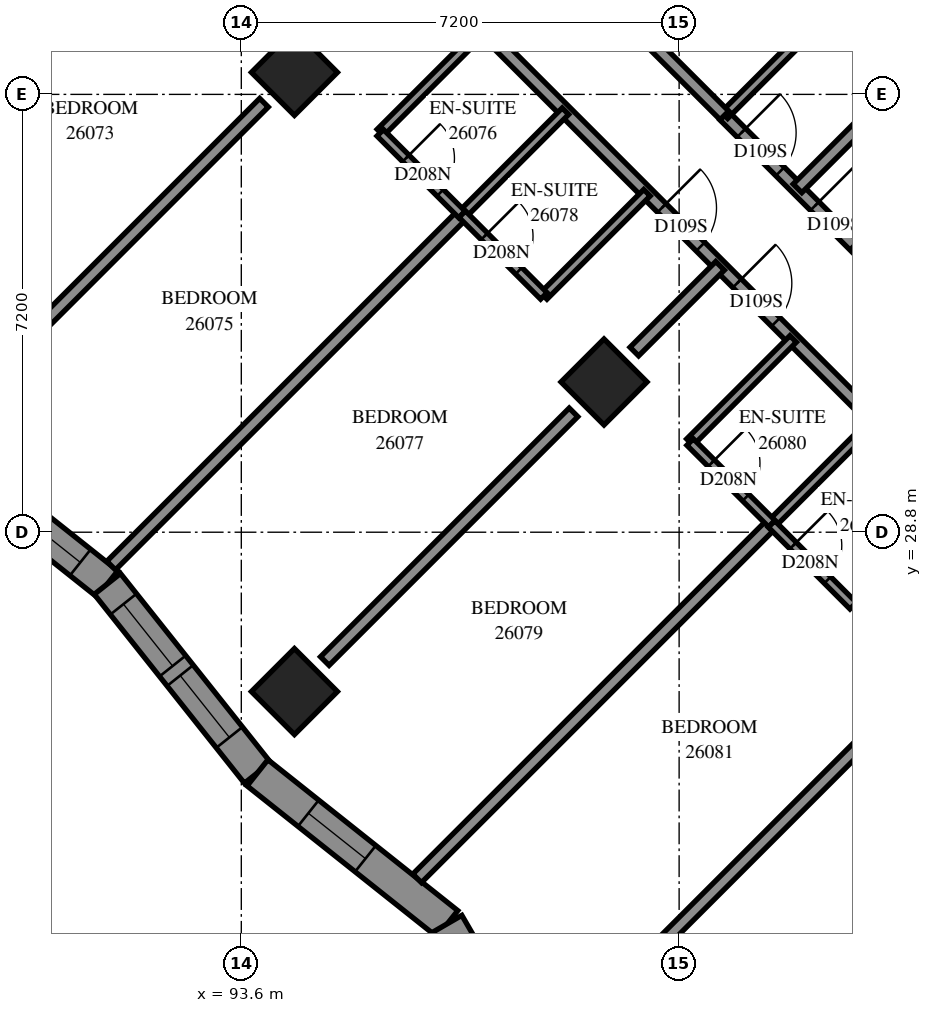
"""IFC4 building model, lengths in metres.
Left out: names, types, materials, properties, quantities, classifications, styles, units other than length and angle.
Written with IfcOpenShell. Run it as: python <this file> out.ifc"""

import sys

from ifc_helpers import new_model, si_unit, direction, frame, frame_2d, origin, origin_2d, place, context, subcontext, project, spatial, polyline, rectangle, outline, extrude, element, fill, save


model = new_model("IFC4")
c1 = context("Model", 3, precision=1e-05, world=origin(), true_north=direction((0.0, 1.0)))
c2 = subcontext(c1, "Body", "Model", "MODEL_VIEW")
j1 = project(units=[si_unit("LENGTHUNIT", "METRE"), si_unit("PLANEANGLEUNIT", "RADIAN")], contexts=[c1])
p1 = place(None, origin())
s1 = spatial("IfcSite", under=j1, at=p1, CompositionType="ELEMENT")
p2 = place(p1, origin())
s2 = spatial("IfcBuilding", under=s1, at=p2, CompositionType="ELEMENT")
p3 = place(p2, frame((0.0, 0.0, 98.2)))
s3 = spatial("IfcBuildingStorey", under=s2, at=p3, CompositionType="ELEMENT", Elevation=98.2)
for number, where, z_axis, x_axis in (
    (1, (94.474, 36.362, 0.0), (0.0, 0.0, 1.0), (0.707, -0.707, 0.0)),
    (2, (99.565, 31.271, 0.0), (0.0, 0.0, 1.0), (0.707, -0.707, 0.0)),
    (3, (94.474, 26.18, 0.0), (0.0, 0.0, 1.0), (0.707, -0.707, 0.0)),
):
    element("IfcColumn", number, at=place(p3, frame(where, z_axis=z_axis, x_axis=x_axis)), inside=s3, PredefinedType="COLUMN", context=c2, shape_type="SweptSolid", body=[
        extrude(rectangle(XDim=1.0, YDim=1.0, at=origin_2d()), origin(), (0.0, 0.0, 1.0), 3.1),
    ])
p4 = place(p3, frame((88.291, 30.419, 0.0), z_axis=(0.0, 0.0, 1.0), x_axis=(0.7829028832, -0.6221439347, 0.0)))
e4 = element("IfcWall", 4, at=p4, inside=s3, PredefinedType="SOLIDWALL", context=c2, shape_type="SweptSolid", body=[
    extrude(outline(polyline([(-0.032, -0.275), (3.937, -0.275), (3.999, 0.275), (0.032, 0.275), (-0.032, -0.275)])), origin(), (0.0, 0.0, 1.0), 3.1),
])
p5 = place(p4, frame((0.6, 0.0, 0.5)))
e5 = element("IfcOpeningElement", 5, at=p5, cuts=e4, PredefinedType="OPENING", context=c2, shape_type="SweptSolid", body=[
    extrude(rectangle(XDim=1.3, YDim=2.45, at=frame_2d((0.65, 1.225))), frame((0.0, 0.285, 0.0), z_axis=(0.0, -1.0, 0.0), x_axis=(1.0, 0.0, 0.0)), (0.0, 0.0, 1.0), 0.57),
])
p6 = place(p4, frame((2.1, 0.0, 0.5)))
e6 = element("IfcOpeningElement", 6, at=p6, cuts=e4, PredefinedType="OPENING", context=c2, shape_type="SweptSolid", body=[
    extrude(rectangle(XDim=1.3, YDim=2.45, at=frame_2d((0.65, 1.225))), frame((0.0, 0.285, 0.0), z_axis=(0.0, -1.0, 0.0), x_axis=(1.0, 0.0, 0.0)), (0.0, 0.0, 1.0), 0.57),
])
p7 = place(p3, frame((91.398, 27.95, 0.0), z_axis=(0.0, 0.0, 1.0), x_axis=(0.6221439347, -0.7829028832, 0.0)))
e7 = element("IfcWall", 7, at=p7, inside=s3, PredefinedType="SOLIDWALL", context=c2, shape_type="SweptSolid", body=[
    extrude(outline(polyline([(0.032, -0.275), (3.999, -0.275), (3.937, 0.275), (-0.032, 0.275), (0.032, -0.275)])), origin(), (0.0, 0.0, 1.0), 3.1),
])
p8 = place(p7, frame((0.425, 0.0, 0.5)))
e8 = element("IfcOpeningElement", 8, at=p8, cuts=e7, PredefinedType="OPENING", context=c2, shape_type="SweptSolid", body=[
    extrude(rectangle(XDim=1.3, YDim=2.45, at=frame_2d((0.65, 1.225))), frame((0.0, 0.285, 0.0), z_axis=(0.0, -1.0, 0.0), x_axis=(1.0, 0.0, 0.0)), (0.0, 0.0, 1.0), 0.57),
])
p9 = place(p7, frame((1.925, 0.0, 0.5)))
e9 = element("IfcOpeningElement", 9, at=p9, cuts=e7, PredefinedType="OPENING", context=c2, shape_type="SweptSolid", body=[
    extrude(rectangle(XDim=1.3, YDim=2.45, at=frame_2d((0.65, 1.225))), frame((0.0, 0.285, 0.0), z_axis=(0.0, -1.0, 0.0), x_axis=(1.0, 0.0, 0.0)), (0.0, 0.0, 1.0), 0.57),
])
p10 = place(p3, frame((93.866, 24.843, 0.0), z_axis=(0.0, 0.0, 1.0), x_axis=(0.7829021595, -0.6221448454, 0.0)))
e10 = element("IfcWall", 10, at=p10, inside=s3, PredefinedType="SOLIDWALL", context=c2, shape_type="SweptSolid", body=[
    extrude(outline(polyline([(-0.032, -0.275), (3.937, -0.275), (4.041, 0.275), (0.032, 0.275), (-0.032, -0.275)])), origin(), (0.0, 0.0, 1.0), 3.1),
])
p11 = place(p10, frame((1.068, 0.0, 0.5)))
e11 = element("IfcOpeningElement", 11, at=p11, cuts=e10, PredefinedType="OPENING", context=c2, shape_type="SweptSolid", body=[
    extrude(rectangle(XDim=1.2, YDim=2.45, at=frame_2d((0.6, 1.225))), frame((0.0, 0.285, 0.0), z_axis=(0.0, -1.0, 0.0), x_axis=(1.0, 0.0, 0.0)), (0.0, 0.0, 1.0), 0.57),
])
p12 = place(p3, frame((96.989, 22.362, 0.0), z_axis=(0.0, 0.0, 1.0), x_axis=(0.5010918167, -0.8653941248, 0.0)))
e12 = element("IfcWall", 12, at=p12, inside=s3, PredefinedType="SOLIDWALL", context=c2, shape_type="SweptSolid", body=[
    extrude(outline(polyline([(0.052, -0.275), (4.132, -0.275), (3.674, 0.275), (-0.052, 0.275), (0.052, -0.275)])), origin(), (0.0, 0.0, 1.0), 3.1),
])
p13 = place(p12, frame((0.908, 0.0, 0.5)))
e13 = element("IfcOpeningElement", 13, at=p13, cuts=e12, PredefinedType="OPENING", context=c2, shape_type="SweptSolid", body=[
    extrude(rectangle(XDim=1.2, YDim=2.45, at=frame_2d((0.6, 1.225))), frame((0.0, 0.285, 0.0), z_axis=(0.0, -1.0, 0.0), x_axis=(1.0, 0.0, 0.0)), (0.0, 0.0, 1.0), 0.57),
])
p14 = place(p3, frame((93.339, 41.309, 0.0), z_axis=(0.0, 0.0, 1.0), x_axis=(0.7071067812, -0.7071067812, 0.0)))
e14 = element("IfcWall", 14, at=p14, inside=s3, PredefinedType="PARTITIONING", context=c2, shape_type="SweptSolid", body=[
    extrude(rectangle(XDim=18.702, YDim=0.2, at=frame_2d((9.351, 0.0))), origin(), (0.0, 0.0, 1.0), 3.1),
])
p15 = place(p14, frame((3.05, 0.0, 0.0)))
e15 = element("IfcOpeningElement", 15, at=p15, cuts=e14, PredefinedType="OPENING", context=c2, shape_type="SweptSolid", body=[
    extrude(rectangle(XDim=0.9, YDim=2.1, at=frame_2d((0.45, 1.05))), frame((0.0, 0.11, 0.0), z_axis=(0.0, -1.0, 0.0), x_axis=(1.0, 0.0, 0.0)), (0.0, 0.0, 1.0), 0.22),
])
p16 = place(p14, frame((4.7, 0.0, 0.0)))
e16 = element("IfcOpeningElement", 16, at=p16, cuts=e14, PredefinedType="OPENING", context=c2, shape_type="SweptSolid", body=[
    extrude(rectangle(XDim=0.9, YDim=2.1, at=frame_2d((0.45, 1.05))), frame((0.0, 0.11, 0.0), z_axis=(0.0, -1.0, 0.0), x_axis=(1.0, 0.0, 0.0)), (0.0, 0.0, 1.0), 0.22),
])
p17 = place(p14, frame((10.149, 0.0, 0.0)))
e17 = element("IfcOpeningElement", 17, at=p17, cuts=e14, PredefinedType="OPENING", context=c2, shape_type="SweptSolid", body=[
    extrude(rectangle(XDim=0.9, YDim=2.1, at=frame_2d((0.45, 1.05))), frame((0.0, 0.11, 0.0), z_axis=(0.0, -1.0, 0.0), x_axis=(1.0, 0.0, 0.0)), (0.0, 0.0, 1.0), 0.22),
])
p18 = place(p14, frame((11.9, 0.0, 0.0)))
e18 = element("IfcOpeningElement", 18, at=p18, cuts=e14, PredefinedType="OPENING", context=c2, shape_type="SweptSolid", body=[
    extrude(rectangle(XDim=0.9, YDim=2.1, at=frame_2d((0.45, 1.05))), frame((0.0, 0.11, 0.0), z_axis=(0.0, -1.0, 0.0), x_axis=(1.0, 0.0, 0.0)), (0.0, 0.0, 1.0), 0.22),
])
p19 = place(p14, frame((17.45, 0.0, 0.0)))
e19 = element("IfcOpeningElement", 19, at=p19, cuts=e14, PredefinedType="OPENING", context=c2, shape_type="SweptSolid", body=[
    extrude(rectangle(XDim=0.9, YDim=2.1, at=frame_2d((0.45, 1.05))), frame((0.0, 0.11, 0.0), z_axis=(0.0, -1.0, 0.0), x_axis=(1.0, 0.0, 0.0)), (0.0, 0.0, 1.0), 0.22),
])
p20 = place(p3, frame((86.835, 34.806, 0.0), z_axis=(0.0, 0.0, 1.0), x_axis=(0.7071067812, 0.7071067812, 0.0)))
e20 = element("IfcWall", 20, at=p20, inside=s3, PredefinedType="PARTITIONING", context=c2, shape_type="SweptSolid", body=[
    extrude(rectangle(XDim=9.201, YDim=0.2, at=frame_2d((4.601, 0.0))), origin(), (0.0, 0.0, 1.0), 3.1),
])
p21 = place(p3, frame((96.492, 23.108, 0.0), z_axis=(0.0, 0.0, 1.0), x_axis=(0.7071128444, 0.7071007179, 0.0)))
e21 = element("IfcWall", 21, at=p21, inside=s3, PredefinedType="PARTITIONING", context=c2, shape_type="SweptSolid", body=[
    extrude(rectangle(XDim=8.246, YDim=0.2, at=frame_2d((4.123, 0.0))), origin(), (0.0, 0.0, 1.0), 3.1),
])
p22 = place(p3, frame((86.341, 33.315, 0.0), z_axis=(0.0, 0.0, 1.0), x_axis=(0.7069849041, 0.7072286373, 0.0)))
e22 = element("IfcWall", 22, at=p22, inside=s3, PredefinedType="PARTITIONING", context=c2, shape_type="SweptSolid", body=[
    extrude(rectangle(XDim=8.206, YDim=0.2, at=frame_2d((4.103, 0.0))), origin(), (0.0, 0.0, 1.0), 3.1),
])
p23 = place(p3, frame((91.46, 28.252, 0.0), z_axis=(0.0, 0.0, 1.0), x_axis=(0.7072292282, 0.706984313, 0.0)))
e23 = element("IfcWall", 23, at=p23, inside=s3, PredefinedType="PARTITIONING", context=c2, shape_type="SweptSolid", body=[
    extrude(rectangle(XDim=8.166, YDim=0.2, at=frame_2d((4.083, 0.0))), origin(), (0.0, 0.0, 1.0), 3.1),
])
p24 = place(p3, frame((100.062, 21.588, 0.0), z_axis=(0.0, 0.0, 1.0), x_axis=(0.7071067812, 0.7071067812, 0.0)))
e24 = element("IfcWall", 24, at=p24, inside=s3, PredefinedType="PARTITIONING", context=c2, shape_type="SweptSolid", body=[
    extrude(rectangle(XDim=5.79, YDim=0.2, at=frame_2d((2.895, 0.0))), origin(), (0.0, 0.0, 1.0), 2.6),
])
p25 = place(p3, frame((89.881, 31.771, 0.0), z_axis=(0.0, 0.0, 1.0), x_axis=(0.7071067812, 0.7071067812, 0.0)))
e25 = element("IfcWall", 25, at=p25, inside=s3, PredefinedType="PARTITIONING", context=c2, shape_type="SweptSolid", body=[
    extrude(rectangle(XDim=5.787, YDim=0.2, at=frame_2d((2.893, 0.0))), origin(), (0.0, 0.0, 1.0), 3.1),
])
p26 = place(p3, frame((94.973, 26.681, 0.0), z_axis=(0.0, 0.0, 1.0), x_axis=(0.7071067812, 0.7071067812, 0.0)))
e26 = element("IfcWall", 26, at=p26, inside=s3, PredefinedType="PARTITIONING", context=c2, shape_type="SweptSolid", body=[
    extrude(rectangle(XDim=5.784, YDim=0.2, at=frame_2d((2.892, 0.0))), origin(), (0.0, 0.0, 1.0), 3.1),
])
p27 = place(p3, frame((101.541, 35.651, 0.0), z_axis=(0.0, 0.0, 1.0), x_axis=(0.7071067812, -0.7071067812, 0.0)))
e27 = element("IfcWall", 27, at=p27, inside=s3, PredefinedType="PARTITIONING", context=c2, shape_type="SweptSolid", body=[
    extrude(rectangle(XDim=3.4, YDim=0.2, at=frame_2d((1.7, 0.0))), origin(), (0.0, 0.0, 1.0), 3.1),
])
p28 = place(p27, frame((0.4, 0.0, 0.0)))
e28 = element("IfcOpeningElement", 28, at=p28, cuts=e27, PredefinedType="OPENING", context=c2, shape_type="SweptSolid", body=[
    extrude(rectangle(XDim=0.9, YDim=2.1, at=frame_2d((0.45, 1.05))), frame((0.0, 0.11, 0.0), z_axis=(0.0, -1.0, 0.0), x_axis=(1.0, 0.0, 0.0)), (0.0, 0.0, 1.0), 0.22),
])
p29 = place(p27, frame((2.105, 0.0, 0.0)))
e29 = element("IfcOpeningElement", 29, at=p29, cuts=e27, PredefinedType="OPENING", context=c2, shape_type="SweptSolid", body=[
    extrude(rectangle(XDim=0.9, YDim=2.1, at=frame_2d((0.45, 1.05))), frame((0.0, 0.11, 0.0), z_axis=(0.0, -1.0, 0.0), x_axis=(1.0, 0.0, 0.0)), (0.0, 0.0, 1.0), 0.22),
])
for number, where, z_axis, x_axis in (
    (30, (100.977, 30.281, 0.0), (0.0, 0.0, 1.0), (0.707, 0.707, 0.0)),
    (31, (98.573, 32.685, 0.0), (0.0, 0.0, 1.0), (0.707, 0.707, 0.0)),
):
    element("IfcWall", number, at=place(p3, frame(where, z_axis=z_axis, x_axis=x_axis)), inside=s3, PredefinedType="PARTITIONING", context=c2, shape_type="SweptSolid", body=[
        extrude(rectangle(XDim=2.401, YDim=0.15, at=frame_2d((1.201, 0.0))), origin(), (0.0, 0.0, 1.0), 3.1),
    ])
p30 = place(p3, frame((97.234, 34.026, 0.0), z_axis=(0.0, 0.0, 1.0), x_axis=(0.706689978, 0.7075233388, 0.0)))
e32 = element("IfcWall", 32, at=p30, inside=s3, PredefinedType="PARTITIONING", context=c2, shape_type="SweptSolid", body=[
    extrude(rectangle(XDim=2.4, YDim=0.15, at=frame_2d((1.2, 0.0))), origin(), (0.0, 0.0, 1.0), 3.1),
])
for number, where, z_axis, x_axis in (
    (33, (95.887, 35.373, 0.0), (0.0, 0.0, 1.0), (0.707, 0.707, 0.0)),
    (34, (101.545, 35.657, 0.0), (0.0, 0.0, 1.0), (0.707, 0.707, 0.0)),
    (35, (102.323, 28.939, 0.0), (0.0, 0.0, 1.0), (0.707, 0.707, 0.0)),
    (36, (103.665, 27.595, 0.0), (0.0, 0.0, 1.0), (0.707, 0.707, 0.0)),
):
    element("IfcWall", number, at=place(p3, frame(where, z_axis=z_axis, x_axis=x_axis)), inside=s3, PredefinedType="PARTITIONING", context=c2, shape_type="SweptSolid", body=[
        extrude(rectangle(XDim=2.398, YDim=0.15, at=frame_2d((1.199, 0.0))), origin(), (0.0, 0.0, 1.0), 3.1),
    ])
p31 = place(p3, frame((100.063, 31.771, 0.0), z_axis=(0.0, 0.0, 1.0), x_axis=(0.7071067812, 0.7071067812, 0.0)))
e37 = element("IfcWall", 37, at=p31, inside=s3, PredefinedType="PARTITIONING", context=c2, shape_type="SweptSolid", body=[
    extrude(rectangle(XDim=1.994, YDim=0.2, at=frame_2d((0.997, 0.0))), origin(), (0.0, 0.0, 1.0), 3.1),
])
p32 = place(p3, frame((102.747, 34.455, 0.0), z_axis=(0.0, 0.0, 1.0), x_axis=(0.7071067812, 0.7071067812, 0.0)))
e38 = element("IfcWall", 38, at=p32, inside=s3, PredefinedType="PARTITIONING", context=c2, shape_type="SweptSolid", body=[
    extrude(rectangle(XDim=1.991, YDim=0.2, at=frame_2d((0.996, 0.0))), origin(), (0.0, 0.0, 1.0), 3.1),
])
p33 = place(p3, frame((95.885, 35.369, 0.0), z_axis=(0.0, 0.0, 1.0), x_axis=(0.7071067812, -0.7071067812, 0.0)))
e39 = element("IfcWall", 39, at=p33, inside=s3, PredefinedType="PARTITIONING", context=c2, shape_type="SweptSolid", body=[
    extrude(rectangle(XDim=1.901, YDim=0.15, at=frame_2d((0.95, 0.0))), origin(), (0.0, 0.0, 1.0), 3.1),
])
p34 = place(p33, frame((0.595, 0.0, 0.0)))
e40 = element("IfcOpeningElement", 40, at=p34, cuts=e39, PredefinedType="OPENING", context=c2, shape_type="SweptSolid", body=[
    extrude(rectangle(XDim=0.8, YDim=2.1, at=frame_2d((0.4, 1.05))), frame((0.0, 0.085, 0.0), z_axis=(0.0, -1.0, 0.0), x_axis=(1.0, 0.0, 0.0)), (0.0, 0.0, 1.0), 0.17),
])
p35 = place(p3, frame((100.981, 30.283, 0.0), z_axis=(0.0, 0.0, 1.0), x_axis=(0.7076330979, -0.7065800724, 0.0)))
e41 = element("IfcWall", 41, at=p35, inside=s3, PredefinedType="PARTITIONING", context=c2, shape_type="SweptSolid", body=[
    extrude(rectangle(XDim=1.899, YDim=0.15, at=frame_2d((0.95, 0.0))), origin(), (0.0, 0.0, 1.0), 3.1),
])
p36 = place(p35, frame((0.493, 0.0, 0.0)))
e42 = element("IfcOpeningElement", 42, at=p36, cuts=e41, PredefinedType="OPENING", context=c2, shape_type="SweptSolid", body=[
    extrude(rectangle(XDim=0.8, YDim=2.1, at=frame_2d((0.4, 1.05))), frame((0.0, 0.085, 0.0), z_axis=(0.0, -1.0, 0.0), x_axis=(1.0, 0.0, 0.0)), (0.0, 0.0, 1.0), 0.17),
])
p37 = place(p3, frame((97.233, 34.029, 0.0), z_axis=(0.0, 0.0, 1.0), x_axis=(0.7065800724, -0.7076330979, 0.0)))
e43 = element("IfcWall", 43, at=p37, inside=s3, PredefinedType="PARTITIONING", context=c2, shape_type="SweptSolid", body=[
    extrude(rectangle(XDim=1.899, YDim=0.15, at=frame_2d((0.95, 0.0))), origin(), (0.0, 0.0, 1.0), 3.1),
])
p38 = place(p37, frame((0.515, 0.0, 0.0)))
e44 = element("IfcOpeningElement", 44, at=p38, cuts=e43, PredefinedType="OPENING", context=c2, shape_type="SweptSolid", body=[
    extrude(rectangle(XDim=0.8, YDim=2.1, at=frame_2d((0.4, 1.05))), frame((0.0, 0.085, 0.0), z_axis=(0.0, -1.0, 0.0), x_axis=(1.0, 0.0, 0.0)), (0.0, 0.0, 1.0), 0.17),
])
p39 = place(p3, frame((100.201, 36.997, 0.0), z_axis=(0.0, 0.0, 1.0), x_axis=(0.7076330979, -0.7065800724, 0.0)))
e45 = element("IfcWall", 45, at=p39, inside=s3, PredefinedType="PARTITIONING", context=c2, shape_type="SweptSolid", body=[
    extrude(rectangle(XDim=1.899, YDim=0.2, at=frame_2d((0.95, 0.0))), origin(), (0.0, 0.0, 1.0), 3.1),
])
p40 = place(p3, frame((102.321, 28.935, 0.0), z_axis=(0.0, 0.0, 1.0), x_axis=(0.7065800724, -0.7076330979, 0.0)))
e46 = element("IfcWall", 46, at=p40, inside=s3, PredefinedType="PARTITIONING", context=c2, shape_type="SweptSolid", body=[
    extrude(rectangle(XDim=1.899, YDim=0.15, at=frame_2d((0.95, 0.0))), origin(), (0.0, 0.0, 1.0), 3.1),
])
p41 = place(p40, frame((0.501, 0.0, 0.0)))
e47 = element("IfcOpeningElement", 47, at=p41, cuts=e46, PredefinedType="OPENING", context=c2, shape_type="SweptSolid", body=[
    extrude(rectangle(XDim=0.8, YDim=2.1, at=frame_2d((0.4, 1.05))), frame((0.0, 0.085, 0.0), z_axis=(0.0, -1.0, 0.0), x_axis=(1.0, 0.0, 0.0)), (0.0, 0.0, 1.0), 0.17),
])
p42 = place(p6, origin())
e48 = element("IfcWindow", 48, at=p42, inside=s3, PartitioningType="SINGLE_PANEL", PredefinedType="WINDOW", context=c2, shape_type="SweptSolid", body=[
    extrude(rectangle(XDim=1.3, YDim=2.45, at=frame_2d((0.65, 1.225))), frame((0.0, 0.155, 0.0), z_axis=(0.0, -1.0, 0.0), x_axis=(1.0, 0.0, 0.0)), (0.0, 0.0, 1.0), 0.06),
])
fill(e6, e48)
p43 = place(p8, origin())
e49 = element("IfcWindow", 49, at=p43, inside=s3, PartitioningType="SINGLE_PANEL", PredefinedType="WINDOW", context=c2, shape_type="SweptSolid", body=[
    extrude(rectangle(XDim=1.3, YDim=2.45, at=frame_2d((0.65, 1.225))), frame((0.0, 0.155, 0.0), z_axis=(0.0, -1.0, 0.0), x_axis=(1.0, 0.0, 0.0)), (0.0, 0.0, 1.0), 0.06),
])
fill(e8, e49)
p44 = place(p9, origin())
e50 = element("IfcWindow", 50, at=p44, inside=s3, PartitioningType="SINGLE_PANEL", PredefinedType="WINDOW", context=c2, shape_type="SweptSolid", body=[
    extrude(rectangle(XDim=1.3, YDim=2.45, at=frame_2d((0.65, 1.225))), frame((0.0, 0.155, 0.0), z_axis=(0.0, -1.0, 0.0), x_axis=(1.0, 0.0, 0.0)), (0.0, 0.0, 1.0), 0.06),
])
fill(e9, e50)
p45 = place(p11, origin())
e51 = element("IfcWindow", 51, at=p45, inside=s3, PartitioningType="SINGLE_PANEL", PredefinedType="WINDOW", context=c2, shape_type="SweptSolid", body=[
    extrude(rectangle(XDim=1.2, YDim=2.45, at=frame_2d((0.6, 1.225))), frame((0.0, 0.155, 0.0), z_axis=(0.0, -1.0, 0.0), x_axis=(1.0, 0.0, 0.0)), (0.0, 0.0, 1.0), 0.06),
])
fill(e11, e51)
p46 = place(p28, origin())
e52 = element("IfcDoor", 52, at=p46, inside=s3, OperationType="SINGLE_SWING_RIGHT", PredefinedType="DOOR", context=c2, shape_type="SweptSolid", body=[
    extrude(rectangle(XDim=0.9, YDim=2.1, at=frame_2d((0.45, 1.05))), frame((0.0, 0.025, 0.0), z_axis=(0.0, -1.0, 0.0), x_axis=(1.0, 0.0, 0.0)), (0.0, 0.0, 1.0), 0.05),
])
fill(e28, e52)
p47 = place(p29, origin())
e53 = element("IfcDoor", 53, at=p47, inside=s3, OperationType="SINGLE_SWING_LEFT", PredefinedType="DOOR", context=c2, shape_type="SweptSolid", body=[
    extrude(rectangle(XDim=0.9, YDim=2.1, at=frame_2d((0.45, 1.05))), frame((0.0, 0.025, 0.0), z_axis=(0.0, -1.0, 0.0), x_axis=(1.0, 0.0, 0.0)), (0.0, 0.0, 1.0), 0.05),
])
fill(e29, e53)
p48 = place(p34, origin())
e54 = element("IfcDoor", 54, at=p48, inside=s3, OperationType="SINGLE_SWING_RIGHT", PredefinedType="DOOR", context=c2, shape_type="SweptSolid", body=[
    extrude(rectangle(XDim=0.8, YDim=2.1, at=frame_2d((0.4, 1.05))), frame((0.0, 0.025, 0.0), z_axis=(0.0, -1.0, 0.0), x_axis=(1.0, 0.0, 0.0)), (0.0, 0.0, 1.0), 0.05),
])
fill(e40, e54)
p49 = place(p17, origin())
e55 = element("IfcDoor", 55, at=p49, inside=s3, OperationType="SINGLE_SWING_LEFT", PredefinedType="DOOR", context=c2, shape_type="SweptSolid", body=[
    extrude(rectangle(XDim=0.9, YDim=2.1, at=frame_2d((0.45, 1.05))), frame((0.0, 0.025, 0.0), z_axis=(0.0, -1.0, 0.0), x_axis=(1.0, 0.0, 0.0)), (0.0, 0.0, 1.0), 0.05),
])
fill(e17, e55)
p50 = place(p38, origin())
e56 = element("IfcDoor", 56, at=p50, inside=s3, OperationType="SINGLE_SWING_RIGHT", PredefinedType="DOOR", context=c2, shape_type="SweptSolid", body=[
    extrude(rectangle(XDim=0.8, YDim=2.1, at=frame_2d((0.4, 1.05))), frame((0.0, 0.025, 0.0), z_axis=(0.0, -1.0, 0.0), x_axis=(1.0, 0.0, 0.0)), (0.0, 0.0, 1.0), 0.05),
])
fill(e44, e56)
p51 = place(p18, origin())
e57 = element("IfcDoor", 57, at=p51, inside=s3, OperationType="SINGLE_SWING_RIGHT", PredefinedType="DOOR", context=c2, shape_type="SweptSolid", body=[
    extrude(rectangle(XDim=0.9, YDim=2.1, at=frame_2d((0.45, 1.05))), frame((0.0, 0.025, 0.0), z_axis=(0.0, -1.0, 0.0), x_axis=(1.0, 0.0, 0.0)), (0.0, 0.0, 1.0), 0.05),
])
fill(e18, e57)
p52 = place(p36, origin())
e58 = element("IfcDoor", 58, at=p52, inside=s3, OperationType="SINGLE_SWING_RIGHT", PredefinedType="DOOR", context=c2, shape_type="SweptSolid", body=[
    extrude(rectangle(XDim=0.8, YDim=2.1, at=frame_2d((0.4, 1.05))), frame((0.0, 0.025, 0.0), z_axis=(0.0, -1.0, 0.0), x_axis=(1.0, 0.0, 0.0)), (0.0, 0.0, 1.0), 0.05),
])
fill(e42, e58)
p53 = place(p41, origin())
e59 = element("IfcDoor", 59, at=p53, inside=s3, OperationType="SINGLE_SWING_RIGHT", PredefinedType="DOOR", context=c2, shape_type="SweptSolid", body=[
    extrude(rectangle(XDim=0.8, YDim=2.1, at=frame_2d((0.4, 1.05))), frame((0.0, 0.025, 0.0), z_axis=(0.0, -1.0, 0.0), x_axis=(1.0, 0.0, 0.0)), (0.0, 0.0, 1.0), 0.05),
])
fill(e47, e59)
save(model, sys.argv[1])
